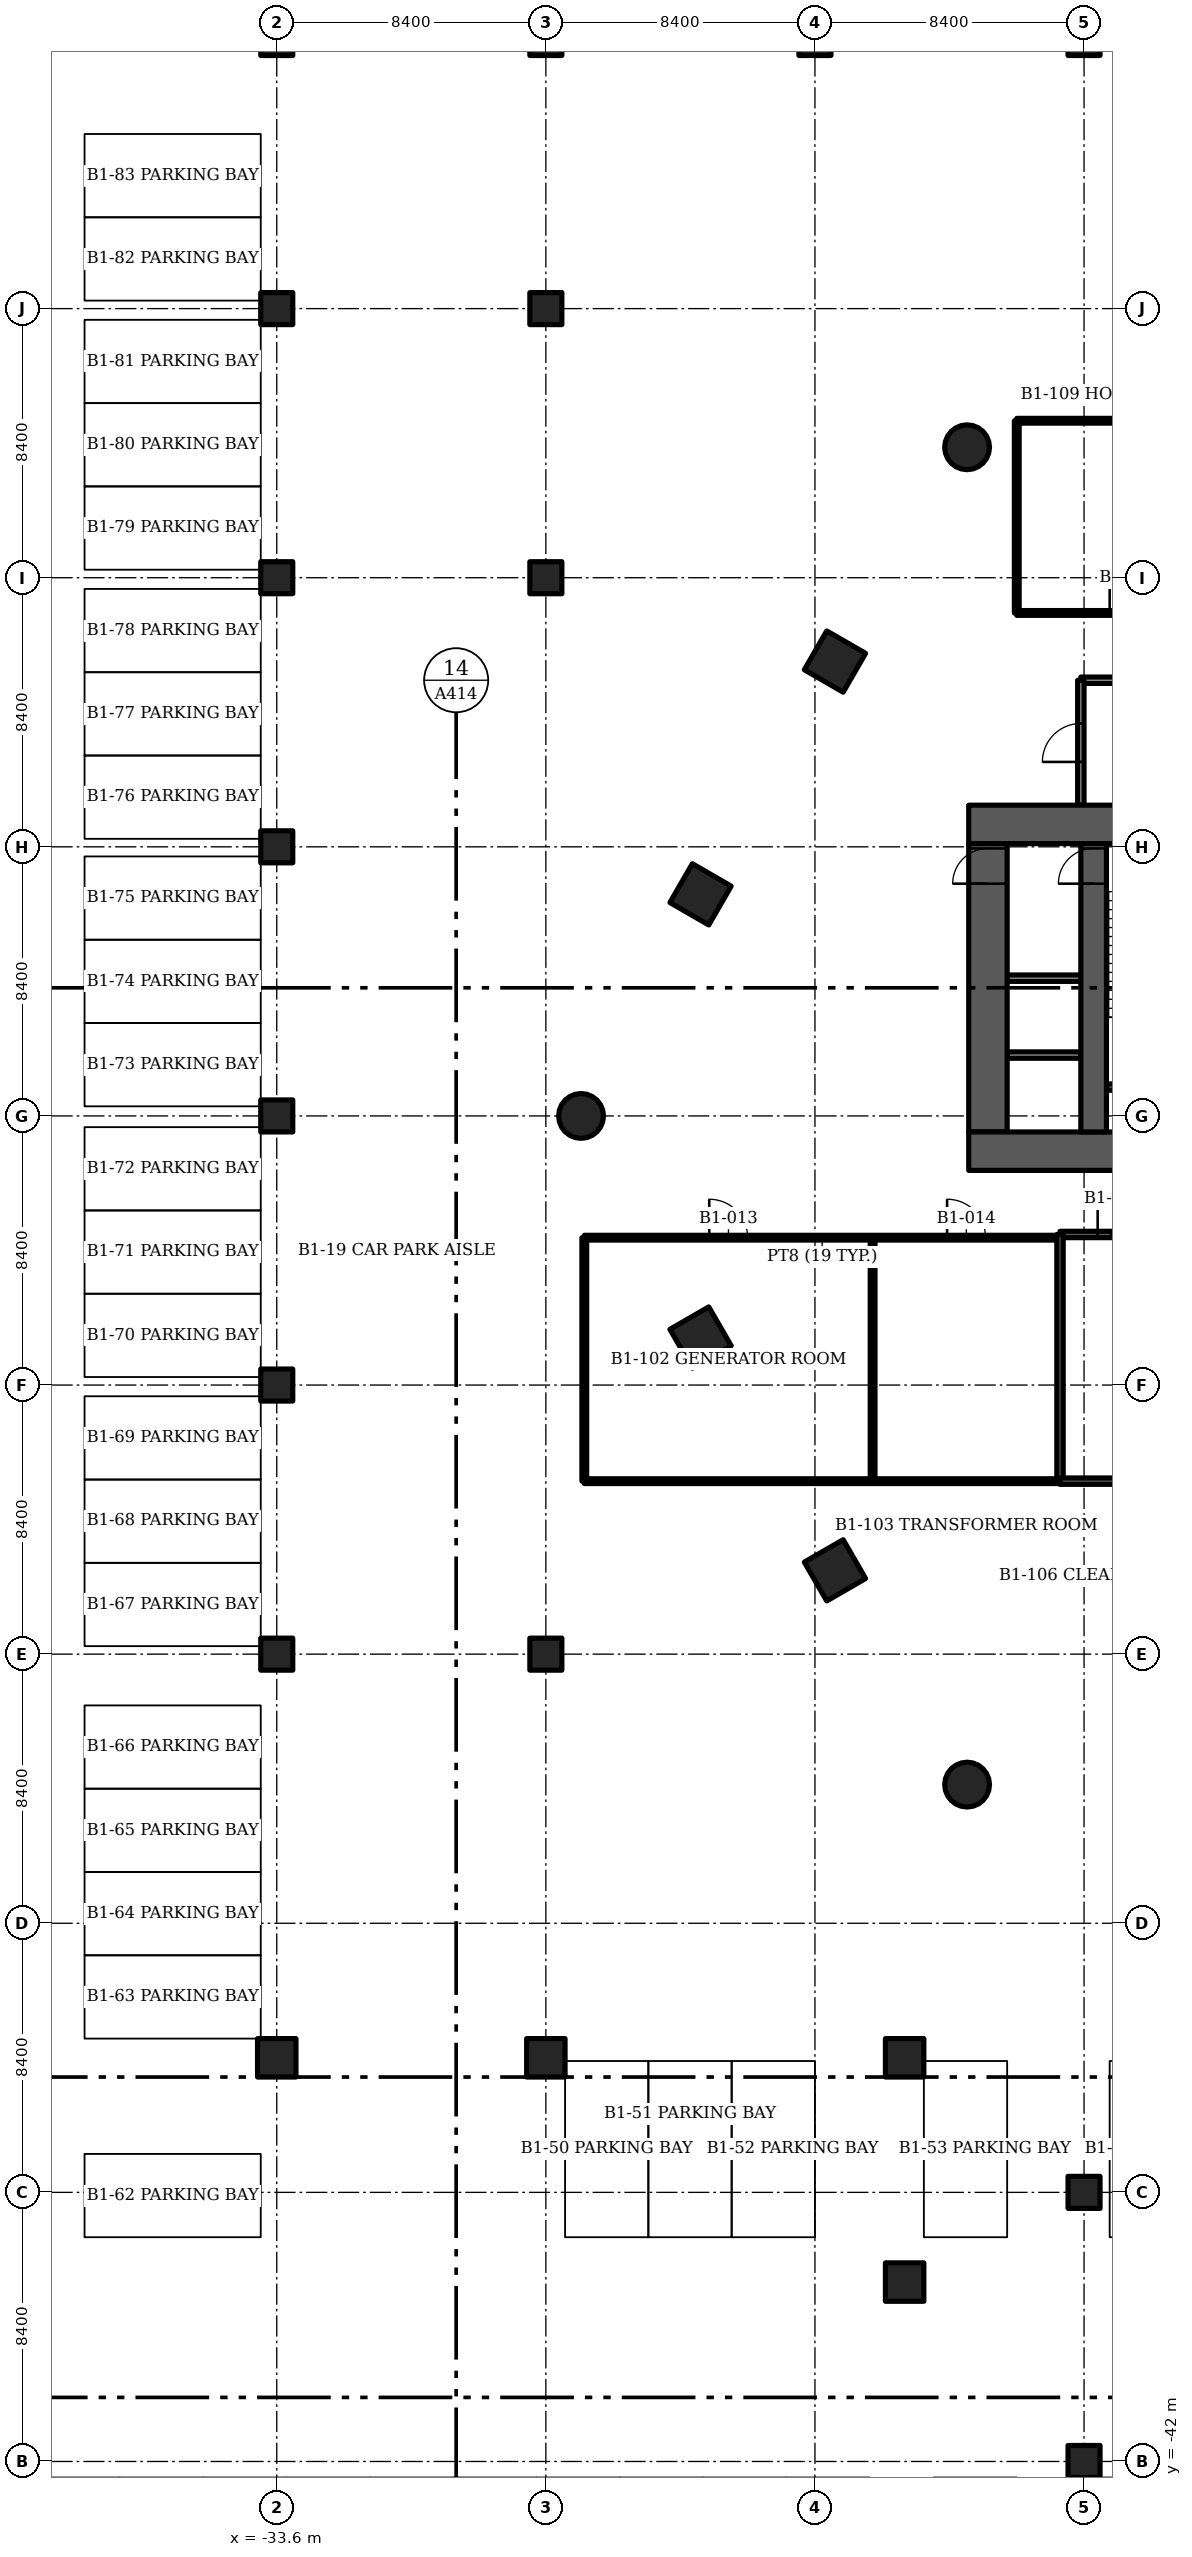
"""IFC4 building model, lengths in metres.
Left out: names, types, materials, properties, quantities, classifications, styles, units other than length and angle.
Written with IfcOpenShell. Run it as: python <this file> out.ifc"""

import sys

from ifc_helpers import new_model, si_unit, direction, frame, frame_2d, origin, origin_2d, place, context, subcontext, project, spatial, rectangle, circle, extrude, element, fill, save


model = new_model("IFC4")
c1 = context("Model", 3, precision=1e-05, world=origin(), true_north=direction((0.0, 1.0)))
c2 = subcontext(c1, "Body", "Model", "MODEL_VIEW")
j1 = project(units=[si_unit("LENGTHUNIT", "METRE"), si_unit("PLANEANGLEUNIT", "RADIAN")], contexts=[c1])
p1 = place(None, origin())
s1 = spatial("IfcSite", under=j1, at=p1, CompositionType="ELEMENT")
p2 = place(p1, origin())
s2 = spatial("IfcBuilding", under=s1, at=p2, CompositionType="ELEMENT")
p3 = place(p2, frame((0.0, 0.0, -5.0)))
s3 = spatial("IfcBuildingStorey", under=s2, at=p3, CompositionType="ELEMENT", Elevation=-5.0)
for number, where, z_axis, x_axis in (
    (1, (-33.6, -16.8, -0.3), (0.0, 0.0, 1.0), (1.0, 0.0, 0.0)),
    (2, (-33.6, -8.4, -0.3), (0.0, 0.0, 1.0), (1.0, 0.0, 0.0)),
    (3, (-33.6, 0.0, -0.3), (0.0, 0.0, 1.0), (1.0, 0.0, 0.0)),
    (4, (-33.6, 8.4, -0.3), (0.0, 0.0, 1.0), (1.0, 0.0, 0.0)),
    (5, (-33.6, 16.8, -0.3), (0.0, 0.0, 1.0), (1.0, 0.0, 0.0)),
    (6, (-33.6, 25.2, -0.3), (0.0, 0.0, 1.0), (1.0, 0.0, 0.0)),
    (7, (-33.6, 33.6, -0.3), (0.0, 0.0, 1.0), (1.0, 0.0, 0.0)),
    (8, (-25.2, -16.8, -0.3), (0.0, 0.0, 1.0), (1.0, 0.0, 0.0)),
    (9, (-25.2, 16.8, -0.3), (0.0, 0.0, 1.0), (1.0, 0.0, 0.0)),
    (10, (-25.2, 25.2, -0.3), (0.0, 0.0, 1.0), (1.0, 0.0, 0.0)),
    (11, (-25.2, 33.6, -0.3), (0.0, 0.0, 1.0), (1.0, 0.0, 0.0)),
    (12, (-16.8, 33.6, -0.3), (0.0, 0.0, 1.0), (1.0, 0.0, 0.0)),
    (13, (-8.4, -42.0, -0.3), (0.0, 0.0, 1.0), (1.0, 0.0, 0.0)),
    (14, (-8.4, -33.6, -0.3), (0.0, 0.0, 1.0), (1.0, 0.0, 0.0)),
    (15, (-8.4, 33.6, -0.3), (0.0, 0.0, 1.0), (1.0, 0.0, 0.0)),
):
    element("IfcColumn", number, at=place(p3, frame(where, z_axis=z_axis, x_axis=x_axis)), inside=s3, PredefinedType="COLUMN", context=c2, shape_type="SweptSolid", body=[
        extrude(rectangle(XDim=1.0, YDim=1.0, at=origin_2d()), origin(), (0.0, 0.0, 1.0), 4.95),
    ])
for number, where, z_axis, x_axis in (
    (16, (-14.0, -36.4, -0.3), (0.0, 0.0, 1.0), (1.0, 0.0, 0.0)),
    (17, (-14.0, -29.4, -0.3), (0.0, 0.0, 1.0), (1.0, 0.0, 0.0)),
    (18, (-33.6, -29.4, -0.3), (0.0, 0.0, 1.0), (1.0, 0.0, 0.0)),
    (19, (-25.2, -29.4, -0.3), (0.0, 0.0, 1.0), (1.0, 0.0, 0.0)),
):
    element("IfcColumn", number, at=place(p3, frame(where, z_axis=z_axis, x_axis=x_axis)), inside=s3, PredefinedType="COLUMN", context=c2, shape_type="SweptSolid", body=[
        extrude(rectangle(XDim=1.2, YDim=1.2, at=origin_2d()), origin(), (0.0, 0.0, 1.0), 4.95),
    ])
for number, where, z_axis, x_axis in (
    (20, (-12.051, 20.872, 0.0), (0.0, 0.0, 1.0), (1.0, 0.0, 0.0)),
    (21, (-24.101, 0.0, 0.0), (0.0, 0.0, 1.0), (1.0, 0.0, 0.0)),
    (22, (-12.051, -20.872, 0.0), (0.0, 0.0, 1.0), (1.0, 0.0, 0.0)),
):
    element("IfcColumn", number, at=place(p3, frame(where, z_axis=z_axis, x_axis=x_axis)), inside=s3, PredefinedType="COLUMN", context=c2, shape_type="SweptSolid", body=[
        extrude(circle(Radius=0.7, at=origin_2d()), origin(), (0.0, 0.0, 1.0), 4.65),
    ])
for number, where, z_axis, x_axis in (
    (23, (-16.175, 14.183, 0.0), (0.0, 0.0, 1.0), (0.5, 0.866, 0.0)),
    (24, (-20.371, 6.917, 0.0), (0.0, 0.0, 1.0), (0.5, 0.866, 0.0)),
    (25, (-20.371, -6.917, 0.0), (0.0, 0.0, 1.0), (-0.5, 0.866, 0.0)),
    (26, (-16.175, -14.183, 0.0), (0.0, 0.0, 1.0), (-0.5, 0.866, 0.0)),
):
    element("IfcColumn", number, at=place(p3, frame(where, z_axis=z_axis, x_axis=x_axis)), inside=s3, PredefinedType="COLUMN", context=c2, shape_type="SweptSolid", body=[
        extrude(rectangle(XDim=1.4, YDim=1.4, at=origin_2d()), origin(), (0.0, 0.0, 1.0), 4.65),
    ])
p4 = place(p3, frame((-12.0, -1.1, 0.0), z_axis=(0.0, 0.0, 1.0), x_axis=(1.0, 0.0, 0.0)))
e27 = element("IfcWall", 27, at=p4, inside=s3, PredefinedType="SHEAR", context=c2, shape_type="SweptSolid", body=[
    extrude(rectangle(XDim=24.0, YDim=1.2, at=frame_2d((12.0, 0.0))), origin(), (0.0, 0.0, 1.0), 4.65),
])
p5 = place(p4, frame((11.2, 0.0, 0.0)))
e28 = element("IfcOpeningElement", 28, at=p5, cuts=e27, PredefinedType="OPENING", context=c2, shape_type="SweptSolid", body=[
    extrude(rectangle(XDim=1.6, YDim=2.1, at=frame_2d((0.8, 1.05))), frame((0.0, 0.6, 0.0), z_axis=(0.0, -1.0, 0.0), x_axis=(1.0, 0.0, 0.0)), (0.0, 0.0, 1.0), 1.2),
])
p6 = place(p3, frame((-12.0, 9.1, 0.0), z_axis=(0.0, 0.0, 1.0), x_axis=(1.0, 0.0, 0.0)))
e29 = element("IfcWall", 29, at=p6, inside=s3, PredefinedType="SHEAR", context=c2, shape_type="SweptSolid", body=[
    extrude(rectangle(XDim=24.0, YDim=1.2, at=frame_2d((12.0, 0.0))), origin(), (0.0, 0.0, 1.0), 4.65),
])
p7 = place(p6, frame((5.25, 0.0, 0.0)))
e30 = element("IfcOpeningElement", 30, at=p7, cuts=e29, PredefinedType="OPENING", context=c2, shape_type="SweptSolid", body=[
    extrude(rectangle(XDim=1.1, YDim=2.1, at=frame_2d((0.55, 1.05))), frame((0.0, 0.6, 0.0), z_axis=(0.0, -1.0, 0.0), x_axis=(1.0, 0.0, 0.0)), (0.0, 0.0, 1.0), 1.2),
])
p8 = place(p6, frame((17.65, 0.0, 0.0)))
e31 = element("IfcOpeningElement", 31, at=p8, cuts=e29, PredefinedType="OPENING", context=c2, shape_type="SweptSolid", body=[
    extrude(rectangle(XDim=1.1, YDim=2.1, at=frame_2d((0.55, 1.05))), frame((0.0, 0.6, 0.0), z_axis=(0.0, -1.0, 0.0), x_axis=(1.0, 0.0, 0.0)), (0.0, 0.0, 1.0), 1.2),
])
p9 = place(p3, frame((-8.1, -0.5, 0.0), z_axis=(0.0, 0.0, 1.0), x_axis=(0.0, 1.0, 0.0)))
e32 = element("IfcWall", 32, at=p9, inside=s3, PredefinedType="SHEAR", context=c2, shape_type="SweptSolid", body=[
    extrude(rectangle(XDim=9.0, YDim=0.8, at=frame_2d((4.5, 0.0))), origin(), (0.0, 0.0, 1.0), 4.65),
])
p10 = place(p9, frame((7.75, 0.0, 0.0)))
e33 = element("IfcOpeningElement", 33, at=p10, cuts=e32, PredefinedType="OPENING", context=c2, shape_type="SweptSolid", body=[
    extrude(rectangle(XDim=1.1, YDim=2.1, at=frame_2d((0.55, 1.05))), frame((0.0, 0.4, 0.0), z_axis=(0.0, -1.0, 0.0), x_axis=(1.0, 0.0, 0.0)), (0.0, 0.0, 1.0), 0.8),
])
p11 = place(p3, frame((-11.4, -0.5, 0.0), z_axis=(0.0, 0.0, 1.0), x_axis=(0.0, 1.0, 0.0)))
e34 = element("IfcWall", 34, at=p11, inside=s3, PredefinedType="SHEAR", context=c2, shape_type="SweptSolid", body=[
    extrude(rectangle(XDim=9.0, YDim=1.2, at=frame_2d((4.5, 0.0))), origin(), (0.0, 0.0, 1.0), 4.65),
])
p12 = place(p11, frame((7.75, 0.0, 0.0)))
e35 = element("IfcOpeningElement", 35, at=p12, cuts=e34, PredefinedType="OPENING", context=c2, shape_type="SweptSolid", body=[
    extrude(rectangle(XDim=1.1, YDim=2.1, at=frame_2d((0.55, 1.05))), frame((0.0, 0.6, 0.0), z_axis=(0.0, -1.0, 0.0), x_axis=(1.0, 0.0, 0.0)), (0.0, 0.0, 1.0), 1.2),
])
p13 = place(p3, frame((-7.7, 0.9, 0.0), z_axis=(0.0, 0.0, 1.0), x_axis=(1.0, 0.0, 0.0)))
e36 = element("IfcWall", 36, at=p13, inside=s3, PredefinedType="SOLIDWALL", context=c2, shape_type="SweptSolid", body=[
    extrude(rectangle(XDim=3.25, YDim=0.2, at=frame_2d((1.625, 0.0))), origin(), (0.0, 0.0, 1.0), 4.65),
])
p14 = place(p3, frame((-8.5, 13.6, 0.0), z_axis=(0.0, 0.0, 1.0), x_axis=(1.0, 0.0, 0.0)))
e37 = element("IfcWall", 37, at=p14, inside=s3, PredefinedType="PARTITIONING", context=c2, shape_type="SweptSolid", body=[
    extrude(rectangle(XDim=17.0, YDim=0.2, at=frame_2d((8.5, 0.0))), origin(), (0.0, 0.0, 1.0), 4.65),
])
p15 = place(p3, frame((-8.5, 9.7, 0.0), z_axis=(0.0, 0.0, 1.0), x_axis=(0.0, 1.0, 0.0)))
e38 = element("IfcWall", 38, at=p15, inside=s3, PredefinedType="PARTITIONING", context=c2, shape_type="SweptSolid", body=[
    extrude(rectangle(XDim=3.9, YDim=0.2, at=frame_2d((1.95, 0.0))), origin(), (0.0, 0.0, 1.0), 4.65),
])
p16 = place(p15, frame((1.35, 0.0, 0.0)))
e39 = element("IfcOpeningElement", 39, at=p16, cuts=e38, PredefinedType="OPENING", context=c2, shape_type="SweptSolid", body=[
    extrude(rectangle(XDim=1.2, YDim=2.1, at=frame_2d((0.6, 1.05))), frame((0.0, 0.1, 0.0), z_axis=(0.0, -1.0, 0.0), x_axis=(1.0, 0.0, 0.0)), (0.0, 0.0, 1.0), 0.2),
])
for number, where, z_axis, x_axis in (
    (40, (-10.8, 1.9, 0.0), (0.0, 0.0, 1.0), (1.0, 0.0, 0.0)),
    (41, (-10.8, 4.3, 0.0), (0.0, 0.0, 1.0), (1.0, 0.0, 0.0)),
):
    element("IfcWall", number, at=place(p3, frame(where, z_axis=z_axis, x_axis=x_axis)), inside=s3, PredefinedType="PARTITIONING", context=c2, shape_type="SweptSolid", body=[
        extrude(rectangle(XDim=2.3, YDim=0.2, at=frame_2d((1.15, 0.0))), origin(), (0.0, 0.0, 1.0), 4.65),
    ])
p17 = place(p3, frame((-24.0, -3.8, 0.0), z_axis=(0.0, 0.0, 1.0), x_axis=(1.0, 0.0, 0.0)))
e42 = element("IfcWall", 42, at=p17, inside=s3, PredefinedType="PARTITIONING", context=c2, shape_type="SweptSolid", body=[
    extrude(rectangle(XDim=14.85, YDim=0.15, at=frame_2d((7.425, 0.0))), origin(), (0.0, 0.0, 1.0), 4.65),
])
p18 = place(p17, frame((3.9, 0.0, 0.0)))
e43 = element("IfcOpeningElement", 43, at=p18, cuts=e42, PredefinedType="OPENING", context=c2, shape_type="SweptSolid", body=[
    extrude(rectangle(XDim=1.2, YDim=2.1, at=frame_2d((0.6, 1.05))), frame((0.0, 0.075, 0.0), z_axis=(0.0, -1.0, 0.0), x_axis=(1.0, 0.0, 0.0)), (0.0, 0.0, 1.0), 0.15),
])
p19 = place(p17, frame((11.325, 0.0, 0.0)))
e44 = element("IfcOpeningElement", 44, at=p19, cuts=e42, PredefinedType="OPENING", context=c2, shape_type="SweptSolid", body=[
    extrude(rectangle(XDim=1.2, YDim=2.1, at=frame_2d((0.6, 1.05))), frame((0.0, 0.075, 0.0), z_axis=(0.0, -1.0, 0.0), x_axis=(1.0, 0.0, 0.0)), (0.0, 0.0, 1.0), 0.15),
])
p20 = place(p3, frame((-24.0, -11.4, 0.0), z_axis=(0.0, 0.0, 1.0), x_axis=(1.0, 0.0, 0.0)))
e45 = element("IfcWall", 45, at=p20, inside=s3, PredefinedType="PARTITIONING", context=c2, shape_type="SweptSolid", body=[
    extrude(rectangle(XDim=14.85, YDim=0.15, at=frame_2d((7.425, 0.0))), origin(), (0.0, 0.0, 1.0), 4.65),
])
for number, where, z_axis, x_axis in (
    (46, (-24.0, -3.8, 0.0), (0.0, 0.0, 1.0), (0.0, -1.0, 0.0)),
    (47, (-15.0, -3.8, 0.0), (0.0, 0.0, 1.0), (0.0, -1.0, 0.0)),
):
    element("IfcWall", number, at=place(p3, frame(where, z_axis=z_axis, x_axis=x_axis)), inside=s3, PredefinedType="PARTITIONING", context=c2, shape_type="SweptSolid", body=[
        extrude(rectangle(XDim=7.6, YDim=0.15, at=frame_2d((3.8, 0.0))), origin(), (0.0, 0.0, 1.0), 4.65),
    ])
p21 = place(p3, frame((-9.15, -3.7, 0.0), z_axis=(0.0, 0.0, 1.0), x_axis=(1.0, 0.0, 0.0)))
e48 = element("IfcWall", 48, at=p21, inside=s3, PredefinedType="SOLIDWALL", context=c2, shape_type="SweptSolid", body=[
    extrude(rectangle(XDim=3.35, YDim=0.2, at=frame_2d((1.675, 0.0))), origin(), (0.0, 0.0, 1.0), 4.65),
])
p22 = place(p21, frame((1.175, 0.0, 0.0)))
e49 = element("IfcOpeningElement", 49, at=p22, cuts=e48, PredefinedType="OPENING", context=c2, shape_type="SweptSolid", body=[
    extrude(rectangle(XDim=1.0, YDim=2.1, at=frame_2d((0.5, 1.05))), frame((0.0, 0.1, 0.0), z_axis=(0.0, -1.0, 0.0), x_axis=(1.0, 0.0, 0.0)), (0.0, 0.0, 1.0), 0.2),
])
p23 = place(p3, frame((-9.15, -3.7, 0.0), z_axis=(0.0, 0.0, 1.0), x_axis=(0.0, -1.0, 0.0)))
e50 = element("IfcWall", 50, at=p23, inside=s3, PredefinedType="SOLIDWALL", context=c2, shape_type="SweptSolid", body=[
    extrude(rectangle(XDim=7.7, YDim=0.2, at=frame_2d((3.85, 0.0))), origin(), (0.0, 0.0, 1.0), 4.65),
])
p24 = place(p3, frame((-9.15, -11.4, 0.0), z_axis=(0.0, 0.0, 1.0), x_axis=(1.0, 0.0, 0.0)))
e51 = element("IfcWall", 51, at=p24, inside=s3, PredefinedType="SOLIDWALL", context=c2, shape_type="SweptSolid", body=[
    extrude(rectangle(XDim=3.35, YDim=0.2, at=frame_2d((1.675, 0.0))), origin(), (0.0, 0.0, 1.0), 4.65),
])
p25 = place(p3, frame((-10.5, 15.7, 0.0), z_axis=(0.0, 0.0, 1.0), x_axis=(1.0, 0.0, 0.0)))
e52 = element("IfcWall", 52, at=p25, inside=s3, PredefinedType="PARTITIONING", context=c2, shape_type="SweptSolid", body=[
    extrude(rectangle(XDim=21.0, YDim=0.15, at=frame_2d((10.5, 0.0))), origin(), (0.0, 0.0, 1.0), 4.65),
])
p26 = place(p25, frame((2.9, 0.0, 0.0)))
e53 = element("IfcOpeningElement", 53, at=p26, cuts=e52, PredefinedType="OPENING", context=c2, shape_type="SweptSolid", body=[
    extrude(rectangle(XDim=1.2, YDim=2.1, at=frame_2d((0.6, 1.05))), frame((0.0, 0.075, 0.0), z_axis=(0.0, -1.0, 0.0), x_axis=(1.0, 0.0, 0.0)), (0.0, 0.0, 1.0), 0.15),
])
p27 = place(p25, frame((9.65, 0.0, 0.0)))
e54 = element("IfcOpeningElement", 54, at=p27, cuts=e52, PredefinedType="OPENING", context=c2, shape_type="SweptSolid", body=[
    extrude(rectangle(XDim=1.2, YDim=2.1, at=frame_2d((0.6, 1.05))), frame((0.0, 0.075, 0.0), z_axis=(0.0, -1.0, 0.0), x_axis=(1.0, 0.0, 0.0)), (0.0, 0.0, 1.0), 0.15),
])
p28 = place(p25, frame((16.65, 0.0, 0.0)))
e55 = element("IfcOpeningElement", 55, at=p28, cuts=e52, PredefinedType="OPENING", context=c2, shape_type="SweptSolid", body=[
    extrude(rectangle(XDim=1.2, YDim=2.1, at=frame_2d((0.6, 1.05))), frame((0.0, 0.075, 0.0), z_axis=(0.0, -1.0, 0.0), x_axis=(1.0, 0.0, 0.0)), (0.0, 0.0, 1.0), 0.15),
])
p29 = place(p3, frame((-10.5, 21.7, 0.0), z_axis=(0.0, 0.0, 1.0), x_axis=(1.0, 0.0, 0.0)))
e56 = element("IfcWall", 56, at=p29, inside=s3, PredefinedType="PARTITIONING", context=c2, shape_type="SweptSolid", body=[
    extrude(rectangle(XDim=21.0, YDim=0.15, at=frame_2d((10.5, 0.0))), origin(), (0.0, 0.0, 1.0), 4.65),
])
p30 = place(p3, frame((-10.5, 15.7, 0.0), z_axis=(0.0, 0.0, 1.0), x_axis=(0.0, 1.0, 0.0)))
e57 = element("IfcWall", 57, at=p30, inside=s3, PredefinedType="PARTITIONING", context=c2, shape_type="SweptSolid", body=[
    extrude(rectangle(XDim=6.0, YDim=0.15, at=frame_2d((3.0, 0.0))), origin(), (0.0, 0.0, 1.0), 4.65),
])
p31 = place(p10, origin())
e58 = element("IfcDoor", 58, at=p31, inside=s3, OperationType="SINGLE_SWING_RIGHT", PredefinedType="DOOR", context=c2, shape_type="SweptSolid", body=[
    extrude(rectangle(XDim=1.1, YDim=2.1, at=frame_2d((0.55, 1.05))), frame((0.0, 0.025, 0.0), z_axis=(0.0, -1.0, 0.0), x_axis=(1.0, 0.0, 0.0)), (0.0, 0.0, 1.0), 0.05),
])
fill(e33, e58)
p32 = place(p16, origin())
e59 = element("IfcDoor", 59, at=p32, inside=s3, OperationType="SINGLE_SWING_LEFT", PredefinedType="DOOR", context=c2, shape_type="SweptSolid", body=[
    extrude(rectangle(XDim=1.2, YDim=2.1, at=frame_2d((0.6, 1.05))), frame((0.0, 0.025, 0.0), z_axis=(0.0, -1.0, 0.0), x_axis=(1.0, 0.0, 0.0)), (0.0, 0.0, 1.0), 0.05),
])
fill(e39, e59)
p33 = place(p12, origin())
e60 = element("IfcDoor", 60, at=p33, inside=s3, OperationType="SINGLE_SWING_LEFT", PredefinedType="DOOR", context=c2, shape_type="SweptSolid", body=[
    extrude(rectangle(XDim=1.1, YDim=2.1, at=frame_2d((0.55, 1.05))), frame((0.0, 0.025, 0.0), z_axis=(0.0, -1.0, 0.0), x_axis=(1.0, 0.0, 0.0)), (0.0, 0.0, 1.0), 0.05),
])
fill(e35, e60)
p34 = place(p18, origin())
e61 = element("IfcDoor", 61, at=p34, inside=s3, OperationType="SINGLE_SWING_LEFT", PredefinedType="DOOR", context=c2, shape_type="SweptSolid", body=[
    extrude(rectangle(XDim=1.2, YDim=2.1, at=frame_2d((0.6, 1.05))), frame((0.0, 0.025, 0.0), z_axis=(0.0, -1.0, 0.0), x_axis=(1.0, 0.0, 0.0)), (0.0, 0.0, 1.0), 0.05),
])
fill(e43, e61)
p35 = place(p19, origin())
e62 = element("IfcDoor", 62, at=p35, inside=s3, OperationType="SINGLE_SWING_LEFT", PredefinedType="DOOR", context=c2, shape_type="SweptSolid", body=[
    extrude(rectangle(XDim=1.2, YDim=2.1, at=frame_2d((0.6, 1.05))), frame((0.0, 0.025, 0.0), z_axis=(0.0, -1.0, 0.0), x_axis=(1.0, 0.0, 0.0)), (0.0, 0.0, 1.0), 0.05),
])
fill(e44, e62)
p36 = place(p22, origin())
e63 = element("IfcDoor", 63, at=p36, inside=s3, OperationType="SINGLE_SWING_LEFT", PredefinedType="DOOR", context=c2, shape_type="SweptSolid", body=[
    extrude(rectangle(XDim=1.0, YDim=2.1, at=frame_2d((0.5, 1.05))), frame((0.0, 0.025, 0.0), z_axis=(0.0, -1.0, 0.0), x_axis=(1.0, 0.0, 0.0)), (0.0, 0.0, 1.0), 0.05),
])
fill(e49, e63)
p37 = place(p26, origin())
e64 = element("IfcDoor", 64, at=p37, inside=s3, OperationType="SINGLE_SWING_LEFT", PredefinedType="DOOR", context=c2, shape_type="SweptSolid", body=[
    extrude(rectangle(XDim=1.2, YDim=2.1, at=frame_2d((0.6, 1.05))), frame((0.0, 0.025, 0.0), z_axis=(0.0, -1.0, 0.0), x_axis=(1.0, 0.0, 0.0)), (0.0, 0.0, 1.0), 0.05),
])
fill(e53, e64)
save(model, sys.argv[1])
